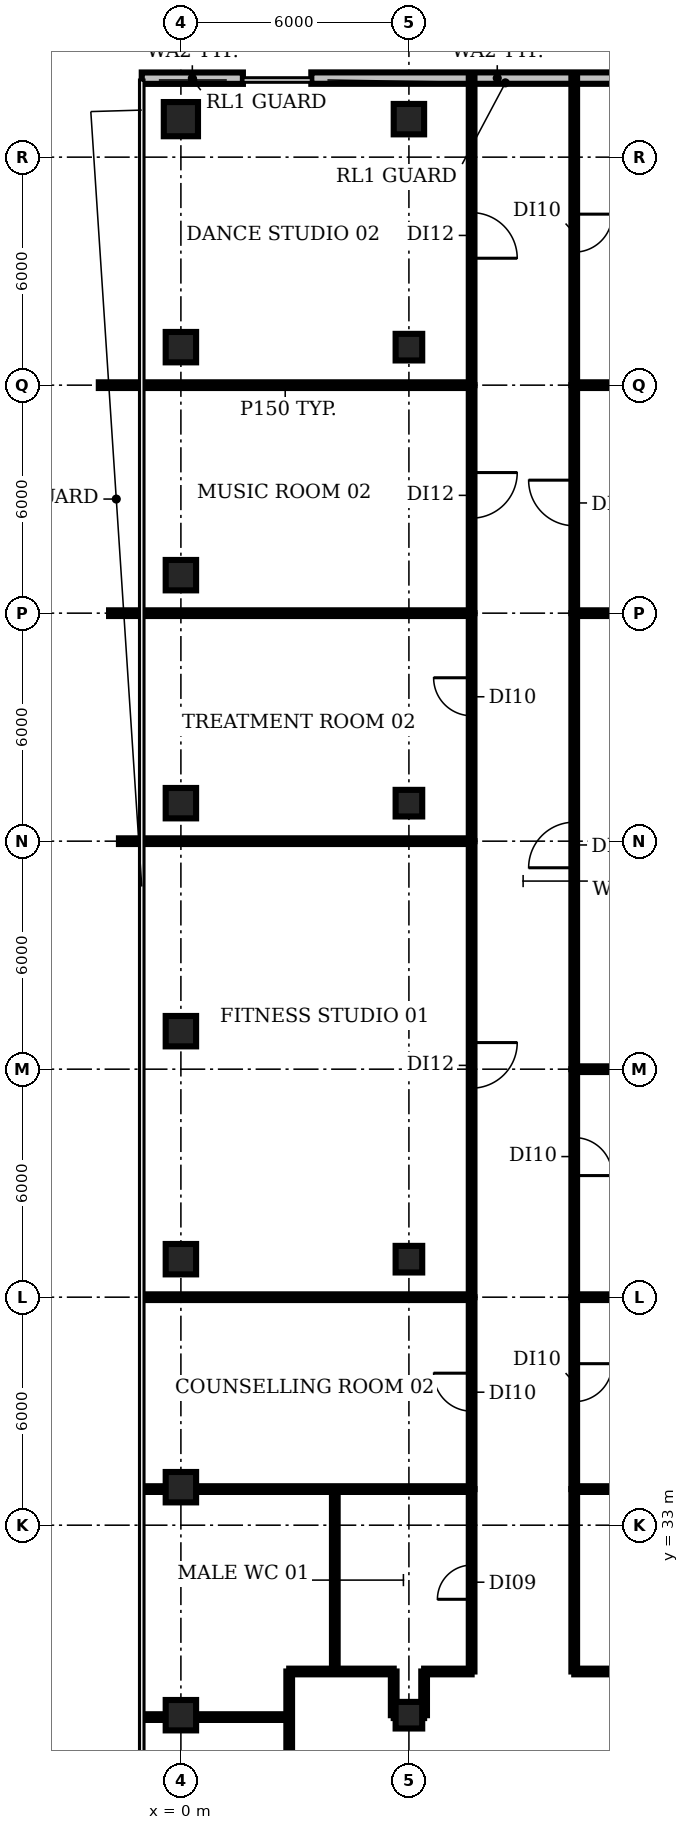
"""IFC4 building model, lengths in metres.
Left out: names, types, materials, properties, quantities, classifications, styles, units other than length and angle.
Written with IfcOpenShell. Run it as: python <this file> out.ifc"""

import sys

from ifc_helpers import new_model, si_unit, direction, frame, frame_2d, origin, origin_2d, place, context, subcontext, project, spatial, rectangle, circle, extrude, element, fill, save


model = new_model("IFC4")
c1 = context("Model", 3, precision=1e-05, world=origin(), true_north=direction((0.0, 1.0)))
c2 = subcontext(c1, "Body", "Model", "MODEL_VIEW")
j1 = project(units=[si_unit("LENGTHUNIT", "METRE"), si_unit("PLANEANGLEUNIT", "RADIAN")], contexts=[c1])
p1 = place(None, origin())
s1 = spatial("IfcSite", under=j1, at=p1, CompositionType="ELEMENT")
p2 = place(p1, origin())
s2 = spatial("IfcBuilding", under=s1, at=p2, CompositionType="ELEMENT")
p3 = place(p2, frame((0.0, 0.0, 218.0)))
s3 = spatial("IfcBuildingStorey", under=s2, at=p3, CompositionType="ELEMENT", Elevation=218.0)
for number, where, z_axis, x_axis in (
    (1, (0.0, 28.0, 0.0), (0.0, 0.0, 1.0), (1.0, 0.0, 0.0)),
    (2, (0.0, 34.0, 0.0), (0.0, 0.0, 1.0), (1.0, 0.0, 0.0)),
    (3, (0.0, 40.0, 0.0), (0.0, 0.0, 1.0), (1.0, 0.0, 0.0)),
    (4, (0.0, 46.0, 0.0), (0.0, 0.0, 1.0), (1.0, 0.0, 0.0)),
    (5, (0.0, 52.0, 0.0), (0.0, 0.0, 1.0), (1.0, 0.0, 0.0)),
    (6, (0.0, 58.0, 0.0), (0.0, 0.0, 1.0), (1.0, 0.0, 0.0)),
    (7, (0.0, 64.0, 0.0), (0.0, 0.0, 1.0), (1.0, 0.0, 0.0)),
):
    element("IfcColumn", number, at=place(p3, frame(where, z_axis=z_axis, x_axis=x_axis)), inside=s3, PredefinedType="COLUMN", context=c2, shape_type="SweptSolid", body=[
        extrude(rectangle(XDim=0.8, YDim=0.8, at=origin_2d()), origin(), (0.0, 0.0, 1.0), 3.85),
    ])
p4 = place(p3, frame((0.0, 70.0, 0.0), z_axis=(0.0, 0.0, 1.0), x_axis=(1.0, 0.0, 0.0)))
e8 = element("IfcColumn", 8, at=p4, inside=s3, PredefinedType="COLUMN", context=c2, shape_type="SweptSolid", body=[
    extrude(circle(Radius=0.45, at=origin_2d()), origin(), (0.0, 0.0, 1.0), 3.85),
])
for number, where, z_axis, x_axis in (
    (9, (6.0, 28.0, 0.0), (0.0, 0.0, 1.0), (1.0, 0.0, 0.0)),
    (10, (6.0, 40.0, 0.0), (0.0, 0.0, 1.0), (1.0, 0.0, 0.0)),
    (11, (6.0, 52.0, 0.0), (0.0, 0.0, 1.0), (1.0, 0.0, 0.0)),
    (12, (6.0, 64.0, 0.0), (0.0, 0.0, 1.0), (1.0, 0.0, 0.0)),
):
    element("IfcColumn", number, at=place(p3, frame(where, z_axis=z_axis, x_axis=x_axis)), inside=s3, PredefinedType="COLUMN", context=c2, shape_type="SweptSolid", body=[
        extrude(rectangle(XDim=0.7, YDim=0.7, at=origin_2d()), origin(), (0.0, 0.0, 1.0), 3.85),
    ])
p5 = place(p3, frame((6.0, 70.0, 0.0), z_axis=(0.0, 0.0, 1.0), x_axis=(1.0, 0.0, 0.0)))
e13 = element("IfcColumn", 13, at=p5, inside=s3, PredefinedType="COLUMN", context=c2, shape_type="SweptSolid", body=[
    extrude(rectangle(XDim=0.8, YDim=0.8, at=origin_2d()), origin(), (0.0, 0.0, 1.0), 3.85),
])
p6 = place(p3, frame((13.217, 71.08, 0.0), z_axis=(0.0, 0.0, 1.0), x_axis=(-1.0, 0.0, 0.0)))
e14 = element("IfcWall", 14, at=p6, inside=s3, PredefinedType="SOLIDWALL", context=c2, shape_type="SweptSolid", body=[
    extrude(rectangle(XDim=9.785, YDim=0.3, at=frame_2d((4.893, 0.0))), origin(), (0.0, 0.0, 1.0), 3.85),
])
p7 = place(p3, frame((1.632, 71.078, 0.0), z_axis=(0.0, 0.0, 1.0), x_axis=(-1.0, 0.0, 0.0)))
e15 = element("IfcWall", 15, at=p7, inside=s3, PredefinedType="SOLIDWALL", context=c2, shape_type="SweptSolid", body=[
    extrude(rectangle(XDim=2.662, YDim=0.3, at=frame_2d((1.331, 0.0))), origin(), (0.0, 0.0, 1.0), 3.85),
])
p8 = place(p3, frame((-2.16, 63.0, 0.0), z_axis=(0.0, 0.0, 1.0), x_axis=(1.0, 0.0, 0.0)))
e16 = element("IfcWall", 16, at=p8, inside=s3, PredefinedType="PARTITIONING", context=c2, shape_type="SweptSolid", body=[
    extrude(rectangle(XDim=9.81, YDim=0.15, at=frame_2d((4.905, 0.0))), origin(), (0.0, 0.0, 1.0), 2.88),
])
p9 = place(p3, frame((-1.89, 57.0, 0.0), z_axis=(0.0, 0.0, 1.0), x_axis=(1.0, 0.0, 0.0)))
e17 = element("IfcWall", 17, at=p9, inside=s3, PredefinedType="PARTITIONING", context=c2, shape_type="SweptSolid", body=[
    extrude(rectangle(XDim=9.54, YDim=0.15, at=frame_2d((4.77, 0.0))), origin(), (0.0, 0.0, 1.0), 2.88),
])
p10 = place(p3, frame((-1.63, 51.0, 0.0), z_axis=(0.0, 0.0, 1.0), x_axis=(1.0, 0.0, 0.0)))
e18 = element("IfcWall", 18, at=p10, inside=s3, PredefinedType="PARTITIONING", context=c2, shape_type="SweptSolid", body=[
    extrude(rectangle(XDim=9.28, YDim=0.15, at=frame_2d((4.64, 0.0))), origin(), (0.0, 0.0, 1.0), 2.88),
])
p11 = place(p3, frame((-0.965, 27.95, 0.0), z_axis=(0.0, 0.0, 1.0), x_axis=(1.0, 0.0, 0.0)))
e19 = element("IfcWall", 19, at=p11, inside=s3, PredefinedType="PARTITIONING", context=c2, shape_type="SweptSolid", body=[
    extrude(rectangle(XDim=3.815, YDim=0.15, at=frame_2d((1.908, 0.0))), origin(), (0.0, 0.0, 1.0), 2.88),
])
p12 = place(p3, frame((-0.98, 33.95, 0.0), z_axis=(0.0, 0.0, 1.0), x_axis=(1.0, 0.0, 0.0)))
e20 = element("IfcWall", 20, at=p12, inside=s3, PredefinedType="PARTITIONING", context=c2, shape_type="SweptSolid", body=[
    extrude(rectangle(XDim=8.63, YDim=0.15, at=frame_2d((4.315, 0.0))), origin(), (0.0, 0.0, 1.0), 2.88),
])
p13 = place(p3, frame((-0.97, 39.0, 0.0), z_axis=(0.0, 0.0, 1.0), x_axis=(1.0, 0.0, 0.0)))
e21 = element("IfcWall", 21, at=p13, inside=s3, PredefinedType="PARTITIONING", context=c2, shape_type="SweptSolid", body=[
    extrude(rectangle(XDim=8.62, YDim=0.15, at=frame_2d((4.31, 0.0))), origin(), (0.0, 0.0, 1.0), 2.88),
])
p14 = place(p3, frame((2.85, 25.25, 0.0), z_axis=(0.0, 0.0, 1.0), x_axis=(0.0, 1.0, 0.0)))
e22 = element("IfcWall", 22, at=p14, inside=s3, PredefinedType="PARTITIONING", context=c2, shape_type="SweptSolid", body=[
    extrude(rectangle(XDim=3.9, YDim=0.15, at=frame_2d((1.95, 0.0))), origin(), (0.0, 0.0, 1.0), 2.88),
])
p15 = place(p3, frame((2.85, 29.15, 0.0), z_axis=(0.0, 0.0, 1.0), x_axis=(1.0, 0.0, 0.0)))
e23 = element("IfcWall", 23, at=p15, inside=s3, PredefinedType="PARTITIONING", context=c2, shape_type="SweptSolid", body=[
    extrude(rectangle(XDim=2.75, YDim=0.15, at=frame_2d((1.375, 0.0))), origin(), (0.0, 0.0, 1.0), 2.88),
])
p16 = place(p3, frame((4.05, 29.15, 0.0), z_axis=(0.0, 0.0, 1.0), x_axis=(0.0, 1.0, 0.0)))
e24 = element("IfcWall", 24, at=p16, inside=s3, PredefinedType="PARTITIONING", context=c2, shape_type="SweptSolid", body=[
    extrude(rectangle(XDim=4.8, YDim=0.15, at=frame_2d((2.4, 0.0))), origin(), (0.0, 0.0, 1.0), 2.88),
])
p17 = place(p3, frame((5.6, 28.0, 0.0), z_axis=(0.0, 0.0, 1.0), x_axis=(0.0, 1.0, 0.0)))
e25 = element("IfcWall", 25, at=p17, inside=s3, PredefinedType="PARTITIONING", context=c2, shape_type="SweptSolid", body=[
    extrude(rectangle(XDim=1.15, YDim=0.15, at=frame_2d((0.575, 0.0))), origin(), (0.0, 0.0, 1.0), 2.88),
])
p18 = place(p3, frame((5.6, 28.0, 0.0), z_axis=(0.0, 0.0, 1.0), x_axis=(1.0, 0.0, 0.0)))
e26 = element("IfcWall", 26, at=p18, inside=s3, PredefinedType="PARTITIONING", context=c2, shape_type="SweptSolid", body=[
    extrude(rectangle(XDim=0.8, YDim=0.15, at=frame_2d((0.4, 0.0))), origin(), (0.0, 0.0, 1.0), 2.88),
])
p19 = place(p3, frame((6.4, 28.0, 0.0), z_axis=(0.0, 0.0, 1.0), x_axis=(0.0, 1.0, 0.0)))
e27 = element("IfcWall", 27, at=p19, inside=s3, PredefinedType="PARTITIONING", context=c2, shape_type="SweptSolid", body=[
    extrude(rectangle(XDim=1.15, YDim=0.15, at=frame_2d((0.575, 0.0))), origin(), (0.0, 0.0, 1.0), 2.88),
])
p20 = place(p3, frame((6.4, 29.15, 0.0), z_axis=(0.0, 0.0, 1.0), x_axis=(1.0, 0.0, 0.0)))
e28 = element("IfcWall", 28, at=p20, inside=s3, PredefinedType="PARTITIONING", context=c2, shape_type="SweptSolid", body=[
    extrude(rectangle(XDim=1.25, YDim=0.15, at=frame_2d((0.625, 0.0))), origin(), (0.0, 0.0, 1.0), 2.88),
])
p21 = place(p3, frame((7.65, 29.15, 0.0), z_axis=(0.0, 0.0, 1.0), x_axis=(0.0, 1.0, 0.0)))
e29 = element("IfcWall", 29, at=p21, inside=s3, PredefinedType="PARTITIONING", context=c2, shape_type="SweptSolid", body=[
    extrude(rectangle(XDim=4.8, YDim=0.15, at=frame_2d((2.4, 0.0))), origin(), (0.0, 0.0, 1.0), 2.88),
])
p22 = place(p21, frame((1.9, 0.0, 0.0)))
e30 = element("IfcOpeningElement", 30, at=p22, cuts=e29, PredefinedType="OPENING", context=c2, shape_type="SweptSolid", body=[
    extrude(rectangle(XDim=0.9, YDim=2.1, at=frame_2d((0.45, 1.05))), frame((0.0, 0.085, 0.0), z_axis=(0.0, -1.0, 0.0), x_axis=(1.0, 0.0, 0.0)), (0.0, 0.0, 1.0), 0.17),
])
p23 = place(p3, frame((7.65, 33.95, 0.0), z_axis=(0.0, 0.0, 1.0), x_axis=(0.0, 1.0, 0.0)))
e31 = element("IfcWall", 31, at=p23, inside=s3, PredefinedType="PARTITIONING", context=c2, shape_type="SweptSolid", body=[
    extrude(rectangle(XDim=5.05, YDim=0.15, at=frame_2d((2.525, 0.0))), origin(), (0.0, 0.0, 1.0), 2.88),
])
p24 = place(p23, frame((2.05, 0.0, 0.0)))
e32 = element("IfcOpeningElement", 32, at=p24, cuts=e31, PredefinedType="OPENING", context=c2, shape_type="SweptSolid", body=[
    extrude(rectangle(XDim=1.0, YDim=2.1, at=frame_2d((0.5, 1.05))), frame((0.0, 0.085, 0.0), z_axis=(0.0, -1.0, 0.0), x_axis=(1.0, 0.0, 0.0)), (0.0, 0.0, 1.0), 0.17),
])
p25 = place(p3, frame((7.65, 51.0, 0.0), z_axis=(0.0, 0.0, 1.0), x_axis=(0.0, -1.0, 0.0)))
e33 = element("IfcWall", 33, at=p25, inside=s3, PredefinedType="PARTITIONING", context=c2, shape_type="SweptSolid", body=[
    extrude(rectangle(XDim=12.0, YDim=0.15, at=frame_2d((6.0, 0.0))), origin(), (0.0, 0.0, 1.0), 2.88),
])
p26 = place(p25, frame((5.3, 0.0, 0.0)))
e34 = element("IfcOpeningElement", 34, at=p26, cuts=e33, PredefinedType="OPENING", context=c2, shape_type="SweptSolid", body=[
    extrude(rectangle(XDim=1.2, YDim=2.1, at=frame_2d((0.6, 1.05))), frame((0.0, 0.085, 0.0), z_axis=(0.0, -1.0, 0.0), x_axis=(1.0, 0.0, 0.0)), (0.0, 0.0, 1.0), 0.17),
])
p27 = place(p3, frame((7.65, 51.0, 0.0), z_axis=(0.0, 0.0, 1.0), x_axis=(0.0, 1.0, 0.0)))
e35 = element("IfcWall", 35, at=p27, inside=s3, PredefinedType="PARTITIONING", context=c2, shape_type="SweptSolid", body=[
    extrude(rectangle(XDim=6.0, YDim=0.15, at=frame_2d((3.0, 0.0))), origin(), (0.0, 0.0, 1.0), 2.88),
])
p28 = place(p27, frame((3.3, 0.0, 0.0)))
e36 = element("IfcOpeningElement", 36, at=p28, cuts=e35, PredefinedType="OPENING", context=c2, shape_type="SweptSolid", body=[
    extrude(rectangle(XDim=1.0, YDim=2.1, at=frame_2d((0.5, 1.05))), frame((0.0, 0.085, 0.0), z_axis=(0.0, -1.0, 0.0), x_axis=(1.0, 0.0, 0.0)), (0.0, 0.0, 1.0), 0.17),
])
p29 = place(p3, frame((7.65, 63.0, 0.0), z_axis=(0.0, 0.0, 1.0), x_axis=(0.0, -1.0, 0.0)))
e37 = element("IfcWall", 37, at=p29, inside=s3, PredefinedType="PARTITIONING", context=c2, shape_type="SweptSolid", body=[
    extrude(rectangle(XDim=6.0, YDim=0.15, at=frame_2d((3.0, 0.0))), origin(), (0.0, 0.0, 1.0), 2.88),
])
p30 = place(p29, frame((2.3, 0.0, 0.0)))
e38 = element("IfcOpeningElement", 38, at=p30, cuts=e37, PredefinedType="OPENING", context=c2, shape_type="SweptSolid", body=[
    extrude(rectangle(XDim=1.2, YDim=2.1, at=frame_2d((0.6, 1.05))), frame((0.0, 0.085, 0.0), z_axis=(0.0, -1.0, 0.0), x_axis=(1.0, 0.0, 0.0)), (0.0, 0.0, 1.0), 0.17),
])
p31 = place(p3, frame((7.65, 71.09, 0.0), z_axis=(0.0, 0.0, 1.0), x_axis=(0.0, -1.0, 0.0)))
e39 = element("IfcWall", 39, at=p31, inside=s3, PredefinedType="PARTITIONING", context=c2, shape_type="SweptSolid", body=[
    extrude(rectangle(XDim=8.09, YDim=0.15, at=frame_2d((4.045, 0.0))), origin(), (0.0, 0.0, 1.0), 2.88),
])
p32 = place(p31, frame((3.55, 0.0, 0.0)))
e40 = element("IfcOpeningElement", 40, at=p32, cuts=e39, PredefinedType="OPENING", context=c2, shape_type="SweptSolid", body=[
    extrude(rectangle(XDim=1.2, YDim=2.1, at=frame_2d((0.6, 1.05))), frame((0.0, 0.085, 0.0), z_axis=(0.0, -1.0, 0.0), x_axis=(1.0, 0.0, 0.0)), (0.0, 0.0, 1.0), 0.17),
])
p33 = place(p3, frame((10.35, 29.15, 0.0), z_axis=(0.0, 0.0, 1.0), x_axis=(0.0, 1.0, 0.0)))
e41 = element("IfcWall", 41, at=p33, inside=s3, PredefinedType="PARTITIONING", context=c2, shape_type="SweptSolid", body=[
    extrude(rectangle(XDim=4.8, YDim=0.15, at=frame_2d((2.4, 0.0))), origin(), (0.0, 0.0, 1.0), 2.88),
])
p34 = place(p3, frame((10.35, 29.15, 0.0), z_axis=(0.0, 0.0, 1.0), x_axis=(1.0, 0.0, 0.0)))
e42 = element("IfcWall", 42, at=p34, inside=s3, PredefinedType="PARTITIONING", context=c2, shape_type="SweptSolid", body=[
    extrude(rectangle(XDim=1.25, YDim=0.15, at=frame_2d((0.625, 0.0))), origin(), (0.0, 0.0, 1.0), 2.88),
])
p35 = place(p3, frame((10.35, 33.95, 0.0), z_axis=(0.0, 0.0, 1.0), x_axis=(1.0, 0.0, 0.0)))
e43 = element("IfcWall", 43, at=p35, inside=s3, PredefinedType="PARTITIONING", context=c2, shape_type="SweptSolid", body=[
    extrude(rectangle(XDim=1.242, YDim=0.15, at=frame_2d((0.621, 0.0))), origin(), (0.0, 0.0, 1.0), 2.88),
])
p36 = place(p3, frame((10.35, 39.0, 0.0), z_axis=(0.0, 0.0, 1.0), x_axis=(0.0, -1.0, 0.0)))
e44 = element("IfcWall", 44, at=p36, inside=s3, PredefinedType="PARTITIONING", context=c2, shape_type="SweptSolid", body=[
    extrude(rectangle(XDim=5.05, YDim=0.15, at=frame_2d((2.525, 0.0))), origin(), (0.0, 0.0, 1.0), 2.88),
])
p37 = place(p36, frame((1.75, 0.0, 0.0)))
e45 = element("IfcOpeningElement", 45, at=p37, cuts=e44, PredefinedType="OPENING", context=c2, shape_type="SweptSolid", body=[
    extrude(rectangle(XDim=1.0, YDim=2.1, at=frame_2d((0.5, 1.05))), frame((0.0, 0.085, 0.0), z_axis=(0.0, -1.0, 0.0), x_axis=(1.0, 0.0, 0.0)), (0.0, 0.0, 1.0), 0.17),
])
p38 = place(p3, frame((10.35, 39.0, 0.0), z_axis=(0.0, 0.0, 1.0), x_axis=(1.0, 0.0, 0.0)))
e46 = element("IfcWall", 46, at=p38, inside=s3, PredefinedType="PARTITIONING", context=c2, shape_type="SweptSolid", body=[
    extrude(rectangle(XDim=14.63, YDim=0.15, at=frame_2d((7.315, 0.0))), origin(), (0.0, 0.0, 1.0), 2.88),
])
p39 = place(p3, frame((10.35, 45.0, 0.0), z_axis=(0.0, 0.0, 1.0), x_axis=(0.0, -1.0, 0.0)))
e47 = element("IfcWall", 47, at=p39, inside=s3, PredefinedType="PARTITIONING", context=c2, shape_type="SweptSolid", body=[
    extrude(rectangle(XDim=6.0, YDim=0.15, at=frame_2d((3.0, 0.0))), origin(), (0.0, 0.0, 1.0), 2.88),
])
p40 = place(p39, frame((1.8, 0.0, 0.0)))
e48 = element("IfcOpeningElement", 48, at=p40, cuts=e47, PredefinedType="OPENING", context=c2, shape_type="SweptSolid", body=[
    extrude(rectangle(XDim=1.0, YDim=2.1, at=frame_2d((0.5, 1.05))), frame((0.0, 0.085, 0.0), z_axis=(0.0, -1.0, 0.0), x_axis=(1.0, 0.0, 0.0)), (0.0, 0.0, 1.0), 0.17),
])
p41 = place(p3, frame((10.35, 45.0, 0.0), z_axis=(0.0, 0.0, 1.0), x_axis=(0.0, 1.0, 0.0)))
e49 = element("IfcWall", 49, at=p41, inside=s3, PredefinedType="PARTITIONING", context=c2, shape_type="SweptSolid", body=[
    extrude(rectangle(XDim=12.0, YDim=0.15, at=frame_2d((6.0, 0.0))), origin(), (0.0, 0.0, 1.0), 2.88),
])
p42 = place(p41, frame((5.3, 0.0, 0.0)))
e50 = element("IfcOpeningElement", 50, at=p42, cuts=e49, PredefinedType="OPENING", context=c2, shape_type="SweptSolid", body=[
    extrude(rectangle(XDim=1.2, YDim=2.1, at=frame_2d((0.6, 1.05))), frame((0.0, 0.085, 0.0), z_axis=(0.0, -1.0, 0.0), x_axis=(1.0, 0.0, 0.0)), (0.0, 0.0, 1.0), 0.17),
])
p43 = place(p3, frame((10.35, 45.0, 0.0), z_axis=(0.0, 0.0, 1.0), x_axis=(1.0, 0.0, 0.0)))
e51 = element("IfcWall", 51, at=p43, inside=s3, PredefinedType="PARTITIONING", context=c2, shape_type="SweptSolid", body=[
    extrude(rectangle(XDim=14.63, YDim=0.15, at=frame_2d((7.315, 0.0))), origin(), (0.0, 0.0, 1.0), 2.88),
])
p44 = place(p3, frame((10.35, 57.0, 0.0), z_axis=(0.0, 0.0, 1.0), x_axis=(0.0, 1.0, 0.0)))
e52 = element("IfcWall", 52, at=p44, inside=s3, PredefinedType="PARTITIONING", context=c2, shape_type="SweptSolid", body=[
    extrude(rectangle(XDim=6.0, YDim=0.15, at=frame_2d((3.0, 0.0))), origin(), (0.0, 0.0, 1.0), 2.88),
])
p45 = place(p44, frame((2.3, 0.0, 0.0)))
e53 = element("IfcOpeningElement", 53, at=p45, cuts=e52, PredefinedType="OPENING", context=c2, shape_type="SweptSolid", body=[
    extrude(rectangle(XDim=1.2, YDim=2.1, at=frame_2d((0.6, 1.05))), frame((0.0, 0.085, 0.0), z_axis=(0.0, -1.0, 0.0), x_axis=(1.0, 0.0, 0.0)), (0.0, 0.0, 1.0), 0.17),
])
for number, where, z_axis, x_axis in (
    (54, (10.35, 57.0, 0.0), (0.0, 0.0, 1.0), (1.0, 0.0, 0.0)),
    (55, (10.35, 63.0, 0.0), (0.0, 0.0, 1.0), (1.0, 0.0, 0.0)),
):
    element("IfcWall", number, at=place(p3, frame(where, z_axis=z_axis, x_axis=x_axis)), inside=s3, PredefinedType="PARTITIONING", context=c2, shape_type="SweptSolid", body=[
        extrude(rectangle(XDim=14.63, YDim=0.15, at=frame_2d((7.315, 0.0))), origin(), (0.0, 0.0, 1.0), 2.88),
    ])
p46 = place(p3, frame((10.35, 71.09, 0.0), z_axis=(0.0, 0.0, 1.0), x_axis=(0.0, -1.0, 0.0)))
e56 = element("IfcWall", 56, at=p46, inside=s3, PredefinedType="PARTITIONING", context=c2, shape_type="SweptSolid", body=[
    extrude(rectangle(XDim=8.09, YDim=0.15, at=frame_2d((4.045, 0.0))), origin(), (0.0, 0.0, 1.0), 2.88),
])
p47 = place(p46, frame((3.59, 0.0, 0.0)))
e57 = element("IfcOpeningElement", 57, at=p47, cuts=e56, PredefinedType="OPENING", context=c2, shape_type="SweptSolid", body=[
    extrude(rectangle(XDim=1.0, YDim=2.1, at=frame_2d((0.5, 1.05))), frame((0.0, 0.085, 0.0), z_axis=(0.0, -1.0, 0.0), x_axis=(1.0, 0.0, 0.0)), (0.0, 0.0, 1.0), 0.17),
])
p48 = place(p22, origin())
e58 = element("IfcDoor", 58, at=p48, inside=s3, OperationType="SINGLE_SWING_LEFT", PredefinedType="DOOR", context=c2, shape_type="SweptSolid", body=[
    extrude(rectangle(XDim=0.9, YDim=2.1, at=frame_2d((0.45, 1.05))), frame((0.0, 0.025, 0.0), z_axis=(0.0, -1.0, 0.0), x_axis=(1.0, 0.0, 0.0)), (0.0, 0.0, 1.0), 0.05),
])
fill(e30, e58)
p49 = place(p24, origin())
e59 = element("IfcDoor", 59, at=p49, inside=s3, OperationType="SINGLE_SWING_RIGHT", PredefinedType="DOOR", context=c2, shape_type="SweptSolid", body=[
    extrude(rectangle(XDim=1.0, YDim=2.1, at=frame_2d((0.5, 1.05))), frame((0.0, 0.025, 0.0), z_axis=(0.0, -1.0, 0.0), x_axis=(1.0, 0.0, 0.0)), (0.0, 0.0, 1.0), 0.05),
])
fill(e32, e59)
p50 = place(p26, origin())
e60 = element("IfcDoor", 60, at=p50, inside=s3, OperationType="SINGLE_SWING_LEFT", PredefinedType="DOOR", context=c2, shape_type="SweptSolid", body=[
    extrude(rectangle(XDim=1.2, YDim=2.1, at=frame_2d((0.6, 1.05))), frame((0.0, 0.025, 0.0), z_axis=(0.0, -1.0, 0.0), x_axis=(1.0, 0.0, 0.0)), (0.0, 0.0, 1.0), 0.05),
])
fill(e34, e60)
p51 = place(p28, origin())
e61 = element("IfcDoor", 61, at=p51, inside=s3, OperationType="SINGLE_SWING_RIGHT", PredefinedType="DOOR", context=c2, shape_type="SweptSolid", body=[
    extrude(rectangle(XDim=1.0, YDim=2.1, at=frame_2d((0.5, 1.05))), frame((0.0, 0.025, 0.0), z_axis=(0.0, -1.0, 0.0), x_axis=(1.0, 0.0, 0.0)), (0.0, 0.0, 1.0), 0.05),
])
fill(e36, e61)
p52 = place(p30, origin())
e62 = element("IfcDoor", 62, at=p52, inside=s3, OperationType="SINGLE_SWING_LEFT", PredefinedType="DOOR", context=c2, shape_type="SweptSolid", body=[
    extrude(rectangle(XDim=1.2, YDim=2.1, at=frame_2d((0.6, 1.05))), frame((0.0, 0.025, 0.0), z_axis=(0.0, -1.0, 0.0), x_axis=(1.0, 0.0, 0.0)), (0.0, 0.0, 1.0), 0.05),
])
fill(e38, e62)
p53 = place(p32, origin())
e63 = element("IfcDoor", 63, at=p53, inside=s3, OperationType="SINGLE_SWING_RIGHT", PredefinedType="DOOR", context=c2, shape_type="SweptSolid", body=[
    extrude(rectangle(XDim=1.2, YDim=2.1, at=frame_2d((0.6, 1.05))), frame((0.0, 0.025, 0.0), z_axis=(0.0, -1.0, 0.0), x_axis=(1.0, 0.0, 0.0)), (0.0, 0.0, 1.0), 0.05),
])
fill(e40, e63)
p54 = place(p37, origin())
e64 = element("IfcDoor", 64, at=p54, inside=s3, OperationType="SINGLE_SWING_LEFT", PredefinedType="DOOR", context=c2, shape_type="SweptSolid", body=[
    extrude(rectangle(XDim=1.0, YDim=2.1, at=frame_2d((0.5, 1.05))), frame((0.0, 0.025, 0.0), z_axis=(0.0, -1.0, 0.0), x_axis=(1.0, 0.0, 0.0)), (0.0, 0.0, 1.0), 0.05),
])
fill(e45, e64)
p55 = place(p40, origin())
e65 = element("IfcDoor", 65, at=p55, inside=s3, OperationType="SINGLE_SWING_RIGHT", PredefinedType="DOOR", context=c2, shape_type="SweptSolid", body=[
    extrude(rectangle(XDim=1.0, YDim=2.1, at=frame_2d((0.5, 1.05))), frame((0.0, 0.025, 0.0), z_axis=(0.0, -1.0, 0.0), x_axis=(1.0, 0.0, 0.0)), (0.0, 0.0, 1.0), 0.05),
])
fill(e48, e65)
p56 = place(p42, origin())
e66 = element("IfcDoor", 66, at=p56, inside=s3, OperationType="SINGLE_SWING_LEFT", PredefinedType="DOOR", context=c2, shape_type="SweptSolid", body=[
    extrude(rectangle(XDim=1.2, YDim=2.1, at=frame_2d((0.6, 1.05))), frame((0.0, 0.025, 0.0), z_axis=(0.0, -1.0, 0.0), x_axis=(1.0, 0.0, 0.0)), (0.0, 0.0, 1.0), 0.05),
])
fill(e50, e66)
p57 = place(p45, origin())
e67 = element("IfcDoor", 67, at=p57, inside=s3, OperationType="SINGLE_SWING_RIGHT", PredefinedType="DOOR", context=c2, shape_type="SweptSolid", body=[
    extrude(rectangle(XDim=1.2, YDim=2.1, at=frame_2d((0.6, 1.05))), frame((0.0, 0.025, 0.0), z_axis=(0.0, -1.0, 0.0), x_axis=(1.0, 0.0, 0.0)), (0.0, 0.0, 1.0), 0.05),
])
fill(e53, e67)
p58 = place(p47, origin())
e68 = element("IfcDoor", 68, at=p58, inside=s3, OperationType="SINGLE_SWING_LEFT", PredefinedType="DOOR", context=c2, shape_type="SweptSolid", body=[
    extrude(rectangle(XDim=1.0, YDim=2.1, at=frame_2d((0.5, 1.05))), frame((0.0, 0.025, 0.0), z_axis=(0.0, -1.0, 0.0), x_axis=(1.0, 0.0, 0.0)), (0.0, 0.0, 1.0), 0.05),
])
fill(e57, e68)
save(model, sys.argv[1])
